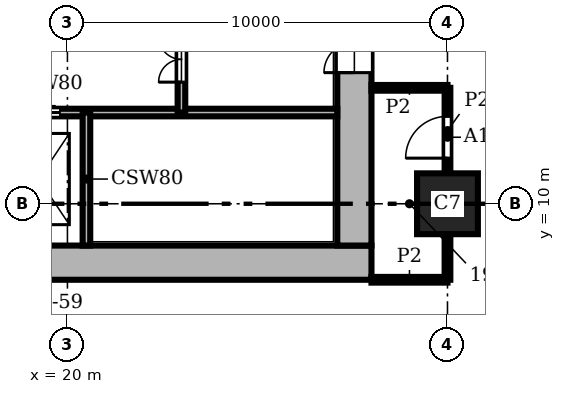
"""IFC4 building model, lengths in metres.
Left out: names, types, materials, properties, quantities, classifications, styles, units other than length and angle.
Written with IfcOpenShell. Run it as: python <this file> out.ifc"""

import sys

from ifc_helpers import new_model, si_unit, direction, frame, frame_2d, origin, origin_2d, place, context, subcontext, project, spatial, rectangle, extrude, element, fill, save


model = new_model("IFC4")
c1 = context("Model", 3, precision=1e-05, world=origin(), true_north=direction((0.0, 1.0)))
c2 = subcontext(c1, "Body", "Model", "MODEL_VIEW")
j1 = project(units=[si_unit("LENGTHUNIT", "METRE"), si_unit("PLANEANGLEUNIT", "RADIAN")], contexts=[c1])
p1 = place(None, origin())
s1 = spatial("IfcSite", under=j1, at=p1, CompositionType="ELEMENT")
p2 = place(p1, origin())
s2 = spatial("IfcBuilding", under=s1, at=p2, CompositionType="ELEMENT")
p3 = place(p2, frame((0.0, 0.0, 12.0)))
s3 = spatial("IfcBuildingStorey", under=s2, at=p3, CompositionType="ELEMENT", Elevation=12.0)
p4 = place(p3, frame((30.0, 10.0, 0.0), z_axis=(0.0, 0.0, 1.0), x_axis=(1.0, 0.0, 0.0)))
e1 = element("IfcColumn", 1, at=p4, inside=s3, PredefinedType="COLUMN", context=c2, shape_type="SweptSolid", body=[
    extrude(rectangle(XDim=1.6, YDim=1.6, at=origin_2d()), origin(), (0.0, 0.0, 1.0), 3.9),
])
p5 = place(p3, frame((8.0, 8.45, 0.0), z_axis=(0.0, 0.0, 1.0), x_axis=(1.0, 0.0, 0.0)))
e2 = element("IfcWall", 2, at=p5, inside=s3, PredefinedType="SHEAR", context=c2, shape_type="SweptSolid", body=[
    extrude(rectangle(XDim=20.0, YDim=0.9, at=frame_2d((10.0, 0.0))), origin(), (0.0, 0.0, 1.0), 3.9),
])
p6 = place(p3, frame((27.55, 8.9, 0.0), z_axis=(0.0, 0.0, 1.0), x_axis=(0.0, 1.0, 0.0)))
e3 = element("IfcWall", 3, at=p6, inside=s3, PredefinedType="SHEAR", context=c2, shape_type="SweptSolid", body=[
    extrude(rectangle(XDim=18.2, YDim=0.9, at=frame_2d((9.1, 0.0))), origin(), (0.0, 0.0, 1.0), 3.9),
])
p7 = place(p6, frame((4.55, 0.0, 0.0)))
e4 = element("IfcOpeningElement", 4, at=p7, cuts=e3, PredefinedType="OPENING", context=c2, shape_type="SweptSolid", body=[
    extrude(rectangle(XDim=1.6, YDim=2.1, at=frame_2d((0.8, 1.05))), frame((0.0, 0.46, 0.0), z_axis=(0.0, -1.0, 0.0), x_axis=(1.0, 0.0, 0.0)), (0.0, 0.0, 1.0), 0.92),
])
p8 = place(p3, frame((13.8, 12.4, 0.0), z_axis=(0.0, 0.0, 1.0), x_axis=(1.0, 0.0, 0.0)))
e5 = element("IfcWall", 5, at=p8, inside=s3, PredefinedType="SHEAR", context=c2, shape_type="SweptSolid", body=[
    extrude(rectangle(XDim=13.3, YDim=0.2, at=frame_2d((6.65, 0.0))), origin(), (0.0, 0.0, 1.0), 3.58),
])
p9 = place(p8, frame((2.4, 0.0, 0.0)))
e6 = element("IfcOpeningElement", 6, at=p9, cuts=e5, PredefinedType="OPENING", context=c2, shape_type="SweptSolid", body=[
    extrude(rectangle(XDim=1.1, YDim=2.1, at=frame_2d((0.55, 1.05))), frame((0.0, 0.11, 0.0), z_axis=(0.0, -1.0, 0.0), x_axis=(1.0, 0.0, 0.0)), (0.0, 0.0, 1.0), 0.22),
])
p10 = place(p8, frame((4.9, 0.0, 0.0)))
e7 = element("IfcOpeningElement", 7, at=p10, cuts=e5, PredefinedType="OPENING", context=c2, shape_type="SweptSolid", body=[
    extrude(rectangle(XDim=1.1, YDim=2.1, at=frame_2d((0.55, 1.05))), frame((0.0, 0.11, 0.0), z_axis=(0.0, -1.0, 0.0), x_axis=(1.0, 0.0, 0.0)), (0.0, 0.0, 1.0), 0.22),
])
p11 = place(p8, frame((0.25, 0.0, 0.0)))
e8 = element("IfcOpeningElement", 8, at=p11, cuts=e5, PredefinedType="OPENING", context=c2, shape_type="SweptSolid", body=[
    extrude(rectangle(XDim=1.0, YDim=2.1, at=frame_2d((0.5, 1.05))), frame((0.0, 0.11, 0.0), z_axis=(0.0, -1.0, 0.0), x_axis=(1.0, 0.0, 0.0)), (0.0, 0.0, 1.0), 0.22),
])
p12 = place(p3, frame((20.5, 8.9, 0.0), z_axis=(0.0, 0.0, 1.0), x_axis=(0.0, 1.0, 0.0)))
e9 = element("IfcWall", 9, at=p12, inside=s3, PredefinedType="SHEAR", context=c2, shape_type="SweptSolid", body=[
    extrude(rectangle(XDim=3.5, YDim=0.2, at=frame_2d((1.75, 0.0))), origin(), (0.0, 0.0, 1.0), 3.58),
])
p13 = place(p3, frame((23.0, 12.4, 0.0), z_axis=(0.0, 0.0, 1.0), x_axis=(0.0, 1.0, 0.0)))
e10 = element("IfcWall", 10, at=p13, inside=s3, PredefinedType="SHEAR", context=c2, shape_type="SweptSolid", body=[
    extrude(rectangle(XDim=2.8, YDim=0.2, at=frame_2d((1.4, 0.0))), origin(), (0.0, 0.0, 1.0), 3.58),
])
p14 = place(p13, frame((0.8, 0.0, 0.0)))
e11 = element("IfcOpeningElement", 11, at=p14, cuts=e10, PredefinedType="OPENING", context=c2, shape_type="SweptSolid", body=[
    extrude(rectangle(XDim=1.2, YDim=2.1, at=frame_2d((0.6, 1.05))), frame((0.0, 0.11, 0.0), z_axis=(0.0, -1.0, 0.0), x_axis=(1.0, 0.0, 0.0)), (0.0, 0.0, 1.0), 0.22),
])
p15 = place(p3, frame((30.0, 8.0, 0.0), z_axis=(0.0, 0.0, 1.0), x_axis=(0.0, 1.0, 0.0)))
e12 = element("IfcWall", 12, at=p15, inside=s3, PredefinedType="PARTITIONING", context=c2, shape_type="SweptSolid", body=[
    extrude(rectangle(XDim=1.2, YDim=0.15, at=frame_2d((0.6, 0.0))), origin(), (0.0, 0.0, 1.0), 3.58),
])
p16 = place(p3, frame((30.0, 10.8, 0.0), z_axis=(0.0, 0.0, 1.0), x_axis=(0.0, 1.0, 0.0)))
e13 = element("IfcWall", 13, at=p16, inside=s3, PredefinedType="PARTITIONING", context=c2, shape_type="SweptSolid", body=[
    extrude(rectangle(XDim=2.25, YDim=0.15, at=frame_2d((1.125, 0.0))), origin(), (0.0, 0.0, 1.0), 3.58),
])
p17 = place(p16, frame((0.4, 0.0, 0.0)))
e14 = element("IfcOpeningElement", 14, at=p17, cuts=e13, PredefinedType="OPENING", context=c2, shape_type="SweptSolid", body=[
    extrude(rectangle(XDim=1.1, YDim=2.1, at=frame_2d((0.55, 1.05))), frame((0.0, 0.085, 0.0), z_axis=(0.0, -1.0, 0.0), x_axis=(1.0, 0.0, 0.0)), (0.0, 0.0, 1.0), 0.17),
])
for number, where, z_axis, x_axis in (
    (15, (28.0, 8.0, 0.0), (0.0, 0.0, 1.0), (1.0, 0.0, 0.0)),
    (16, (28.0, 13.05, 0.0), (0.0, 0.0, 1.0), (1.0, 0.0, 0.0)),
):
    element("IfcWall", number, at=place(p3, frame(where, z_axis=z_axis, x_axis=x_axis)), inside=s3, PredefinedType="PARTITIONING", context=c2, shape_type="SweptSolid", body=[
        extrude(rectangle(XDim=2.0, YDim=0.15, at=frame_2d((1.0, 0.0))), origin(), (0.0, 0.0, 1.0), 3.58),
    ])
p18 = place(p10, origin())
e17 = element("IfcDoor", 17, at=p18, inside=s3, OperationType="DOUBLE_DOOR_SLIDING", PredefinedType="DOOR", context=c2, shape_type="SweptSolid", body=[
    extrude(rectangle(XDim=1.1, YDim=2.1, at=frame_2d((0.55, 1.05))), frame((0.0, 0.025, 0.0), z_axis=(0.0, -1.0, 0.0), x_axis=(1.0, 0.0, 0.0)), (0.0, 0.0, 1.0), 0.05),
])
fill(e7, e17)
p19 = place(p14, origin())
e18 = element("IfcDoor", 18, at=p19, inside=s3, OperationType="DOUBLE_DOOR_SINGLE_SWING", PredefinedType="DOOR", context=c2, shape_type="SweptSolid", body=[
    extrude(rectangle(XDim=1.2, YDim=2.1, at=frame_2d((0.6, 1.05))), frame((0.0, 0.025, 0.0), z_axis=(0.0, -1.0, 0.0), x_axis=(1.0, 0.0, 0.0)), (0.0, 0.0, 1.0), 0.05),
])
fill(e11, e18)
p20 = place(p7, origin())
e19 = element("IfcDoor", 19, at=p20, inside=s3, OperationType="DOUBLE_DOOR_SINGLE_SWING", PredefinedType="DOOR", context=c2, shape_type="SweptSolid", body=[
    extrude(rectangle(XDim=1.6, YDim=2.1, at=frame_2d((0.8, 1.05))), frame((0.0, 0.025, 0.0), z_axis=(0.0, -1.0, 0.0), x_axis=(1.0, 0.0, 0.0)), (0.0, 0.0, 1.0), 0.05),
])
fill(e4, e19)
p21 = place(p17, origin())
e20 = element("IfcDoor", 20, at=p21, inside=s3, OperationType="SINGLE_SWING_LEFT", PredefinedType="DOOR", context=c2, shape_type="SweptSolid", body=[
    extrude(rectangle(XDim=1.1, YDim=2.1, at=frame_2d((0.55, 1.05))), frame((0.0, 0.025, 0.0), z_axis=(0.0, -1.0, 0.0), x_axis=(1.0, 0.0, 0.0)), (0.0, 0.0, 1.0), 0.05),
])
fill(e14, e20)
save(model, sys.argv[1])
